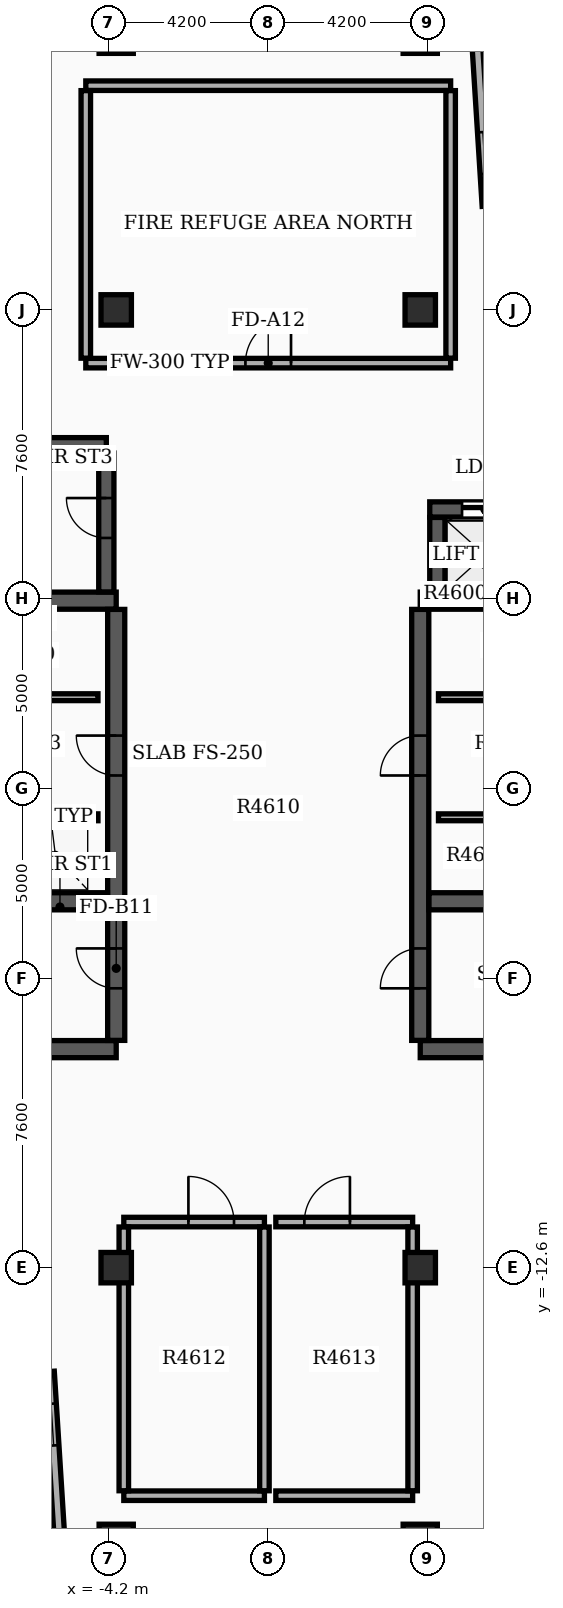
"""IFC4 building model, lengths in metres.
Left out: names, types, materials, properties, quantities, classifications, styles, units other than length and angle.
Written with IfcOpenShell. Run it as: python <this file> out.ifc"""

import sys

from ifc_helpers import new_model, si_unit, direction, frame, frame_2d, origin, origin_2d, place, context, subcontext, project, spatial, rectangle, circle, extrude, element, fill, save


model = new_model("IFC4")
c1 = context("Model", 3, precision=1e-05, world=origin(), true_north=direction((0.0, 1.0)))
c2 = subcontext(c1, "Body", "Model", "MODEL_VIEW")
j1 = project(units=[si_unit("LENGTHUNIT", "METRE"), si_unit("PLANEANGLEUNIT", "RADIAN")], contexts=[c1])
p1 = place(None, origin())
s1 = spatial("IfcSite", under=j1, at=p1, CompositionType="ELEMENT")
p2 = place(p1, origin())
s2 = spatial("IfcBuilding", under=s1, at=p2, CompositionType="ELEMENT")
p3 = place(p2, frame((0.0, 0.0, 288.9)))
s3 = spatial("IfcBuildingStorey", under=s2, at=p3, CompositionType="ELEMENT", Elevation=288.9)
for number, where, z_axis, x_axis in (
    (1, (-12.4, -6.85, 0.0), (0.0, 0.0, 1.0), (1.0, 0.0, 0.0)),
    (2, (-12.4, 4.95, 0.0), (0.0, 0.0, 1.0), (1.0, 0.0, 0.0)),
):
    element("IfcWall", number, at=place(p3, frame(where, z_axis=z_axis, x_axis=x_axis)), inside=s3, PredefinedType="SHEAR", context=c2, shape_type="SweptSolid", body=[
        extrude(rectangle(XDim=8.4, YDim=0.45, at=frame_2d((4.2, 0.0))), origin(), (0.0, 0.0, 1.0), 4.85),
    ])
p4 = place(p3, frame((-4.0, -6.62, 0.0), z_axis=(0.0, 0.0, 1.0), x_axis=(0.0, 1.0, 0.0)))
e3 = element("IfcWall", 3, at=p4, inside=s3, PredefinedType="SHEAR", context=c2, shape_type="SweptSolid", body=[
    extrude(rectangle(XDim=11.34, YDim=0.45, at=frame_2d((5.67, 0.0))), origin(), (0.0, 0.0, 1.0), 4.85),
])
p5 = place(p4, frame((1.37, 0.0, 0.0)))
e4 = element("IfcOpeningElement", 4, at=p5, cuts=e3, PredefinedType="OPENING", context=c2, shape_type="SweptSolid", body=[
    extrude(rectangle(XDim=1.05, YDim=2.15, at=frame_2d((0.525, 1.075))), frame((0.0, 0.235, 0.0), z_axis=(0.0, -1.0, 0.0), x_axis=(1.0, 0.0, 0.0)), (0.0, 0.0, 1.0), 0.47),
])
p6 = place(p4, frame((6.97, 0.0, 0.0)))
e5 = element("IfcOpeningElement", 5, at=p6, cuts=e3, PredefinedType="OPENING", context=c2, shape_type="SweptSolid", body=[
    extrude(rectangle(XDim=1.05, YDim=2.15, at=frame_2d((0.525, 1.075))), frame((0.0, 0.235, 0.0), z_axis=(0.0, -1.0, 0.0), x_axis=(1.0, 0.0, 0.0)), (0.0, 0.0, 1.0), 0.47),
])
p7 = place(p3, frame((-12.17, -2.96, 0.0), z_axis=(0.0, 0.0, 1.0), x_axis=(1.0, 0.0, 0.0)))
e6 = element("IfcWall", 6, at=p7, inside=s3, PredefinedType="SHEAR", context=c2, shape_type="SweptSolid", body=[
    extrude(rectangle(XDim=7.94, YDim=0.45, at=frame_2d((3.97, 0.0))), origin(), (0.0, 0.0, 1.0), 4.85),
])
for number, where, z_axis, x_axis in (
    (7, (4.0, -6.85, 0.0), (0.0, 0.0, 1.0), (1.0, 0.0, 0.0)),
    (8, (4.0, 4.95, 0.0), (0.0, 0.0, 1.0), (1.0, 0.0, 0.0)),
):
    element("IfcWall", number, at=place(p3, frame(where, z_axis=z_axis, x_axis=x_axis)), inside=s3, PredefinedType="SHEAR", context=c2, shape_type="SweptSolid", body=[
        extrude(rectangle(XDim=8.4, YDim=0.45, at=frame_2d((4.2, 0.0))), origin(), (0.0, 0.0, 1.0), 4.85),
    ])
p8 = place(p3, frame((4.0, -6.62, 0.0), z_axis=(0.0, 0.0, 1.0), x_axis=(0.0, 1.0, 0.0)))
e9 = element("IfcWall", 9, at=p8, inside=s3, PredefinedType="SHEAR", context=c2, shape_type="SweptSolid", body=[
    extrude(rectangle(XDim=11.34, YDim=0.45, at=frame_2d((5.67, 0.0))), origin(), (0.0, 0.0, 1.0), 4.85),
])
p9 = place(p8, frame((1.37, 0.0, 0.0)))
e10 = element("IfcOpeningElement", 10, at=p9, cuts=e9, PredefinedType="OPENING", context=c2, shape_type="SweptSolid", body=[
    extrude(rectangle(XDim=1.05, YDim=2.15, at=frame_2d((0.525, 1.075))), frame((0.0, 0.235, 0.0), z_axis=(0.0, -1.0, 0.0), x_axis=(1.0, 0.0, 0.0)), (0.0, 0.0, 1.0), 0.47),
])
p10 = place(p8, frame((6.97, 0.0, 0.0)))
e11 = element("IfcOpeningElement", 11, at=p10, cuts=e9, PredefinedType="OPENING", context=c2, shape_type="SweptSolid", body=[
    extrude(rectangle(XDim=1.05, YDim=2.15, at=frame_2d((0.525, 1.075))), frame((0.0, 0.235, 0.0), z_axis=(0.0, -1.0, 0.0), x_axis=(1.0, 0.0, 0.0)), (0.0, 0.0, 1.0), 0.47),
])
p11 = place(p3, frame((4.23, -2.96, 0.0), z_axis=(0.0, 0.0, 1.0), x_axis=(1.0, 0.0, 0.0)))
e12 = element("IfcWall", 12, at=p11, inside=s3, PredefinedType="SHEAR", context=c2, shape_type="SweptSolid", body=[
    extrude(rectangle(XDim=7.94, YDim=0.45, at=frame_2d((3.97, 0.0))), origin(), (0.0, 0.0, 1.0), 4.85),
])
p12 = place(p3, frame((-12.22, 9.04, 0.0), z_axis=(0.0, 0.0, 1.0), x_axis=(1.0, 0.0, 0.0)))
e13 = element("IfcWall", 13, at=p12, inside=s3, PredefinedType="SHEAR", context=c2, shape_type="SweptSolid", body=[
    extrude(rectangle(XDim=7.96, YDim=0.4, at=frame_2d((3.98, 0.0))), origin(), (0.0, 0.0, 1.0), 4.85),
])
p13 = place(p3, frame((-4.26, 5.18, 0.0), z_axis=(0.0, 0.0, 1.0), x_axis=(0.0, 1.0, 0.0)))
e14 = element("IfcWall", 14, at=p13, inside=s3, PredefinedType="SHEAR", context=c2, shape_type="SweptSolid", body=[
    extrude(rectangle(XDim=3.655, YDim=0.4, at=frame_2d((1.828, 0.0))), origin(), (0.0, 0.0, 1.0), 4.85),
])
p14 = place(p13, frame((1.42, 0.0, 0.0)))
e15 = element("IfcOpeningElement", 15, at=p14, cuts=e14, PredefinedType="OPENING", context=c2, shape_type="SweptSolid", body=[
    extrude(rectangle(XDim=1.05, YDim=2.15, at=frame_2d((0.525, 1.075))), frame((0.0, 0.21, 0.0), z_axis=(0.0, -1.0, 0.0), x_axis=(1.0, 0.0, 0.0)), (0.0, 0.0, 1.0), 0.42),
])
p15 = place(p3, frame((4.45, 5.18, 0.0), z_axis=(0.0, 0.0, 1.0), x_axis=(0.0, 1.0, 0.0)))
e16 = element("IfcWall", 16, at=p15, inside=s3, PredefinedType="SHEAR", context=c2, shape_type="SweptSolid", body=[
    extrude(rectangle(XDim=1.96, YDim=0.4, at=frame_2d((0.98, 0.0))), origin(), (0.0, 0.0, 1.0), 4.85),
])
p16 = place(p3, frame((4.25, 7.35, 0.0), z_axis=(0.0, 0.0, 1.0), x_axis=(1.0, 0.0, 0.0)))
e17 = element("IfcWall", 17, at=p16, inside=s3, PredefinedType="SHEAR", context=c2, shape_type="SweptSolid", body=[
    extrude(rectangle(XDim=5.4, YDim=0.4, at=frame_2d((2.7, 0.0))), origin(), (0.0, 0.0, 1.0), 4.85),
])
p17 = place(p16, frame((0.85, 0.0, 0.0)))
e18 = element("IfcOpeningElement", 18, at=p17, cuts=e17, PredefinedType="OPENING", context=c2, shape_type="SweptSolid", body=[
    extrude(rectangle(XDim=1.2, YDim=2.2, at=frame_2d((0.6, 1.1))), frame((0.0, 0.21, 0.0), z_axis=(0.0, -1.0, 0.0), x_axis=(1.0, 0.0, 0.0)), (0.0, 0.0, 1.0), 0.42),
])
p18 = place(p16, frame((3.25, 0.0, 0.0)))
e19 = element("IfcOpeningElement", 19, at=p18, cuts=e17, PredefinedType="OPENING", context=c2, shape_type="SweptSolid", body=[
    extrude(rectangle(XDim=1.2, YDim=2.2, at=frame_2d((0.6, 1.1))), frame((0.0, 0.21, 0.0), z_axis=(0.0, -1.0, 0.0), x_axis=(1.0, 0.0, 0.0)), (0.0, 0.0, 1.0), 0.42),
])
for number, where, z_axis, x_axis in (
    (20, (-4.0, -12.6, 0.0), (0.0, 0.0, 1.0), (1.0, 0.0, 0.0)),
    (21, (4.0, -12.6, 0.0), (0.0, 0.0, 1.0), (1.0, 0.0, 0.0)),
    (22, (4.0, 12.6, 0.0), (0.0, 0.0, 1.0), (1.0, 0.0, 0.0)),
    (23, (-4.0, 12.6, 0.0), (0.0, 0.0, 1.0), (1.0, 0.0, 0.0)),
):
    element("IfcColumn", number, at=place(p3, frame(where, z_axis=z_axis, x_axis=x_axis)), inside=s3, PredefinedType="COLUMN", context=c2, shape_type="SweptSolid", body=[
        extrude(rectangle(XDim=0.8, YDim=0.8, at=origin_2d()), origin(), (0.0, 0.0, 1.0), 5.1),
    ])
for number, where, z_axis, x_axis in (
    (24, (-4.0, -19.8, 0.0), (0.0, 0.0, 1.0), (1.0, 0.0, 0.0)),
    (25, (4.0, -19.8, 0.0), (0.0, 0.0, 1.0), (1.0, 0.0, 0.0)),
    (26, (-4.0, 19.8, 0.0), (0.0, 0.0, 1.0), (1.0, 0.0, 0.0)),
    (27, (4.0, 19.8, 0.0), (0.0, 0.0, 1.0), (1.0, 0.0, 0.0)),
):
    element("IfcColumn", number, at=place(p3, frame(where, z_axis=z_axis, x_axis=x_axis)), inside=s3, PredefinedType="COLUMN", context=c2, shape_type="SweptSolid", body=[
        extrude(circle(Radius=0.45, at=origin_2d()), origin(), (0.0, 0.0, 1.0), 5.1),
    ])
p19 = place(p3, frame((5.769, 15.333, 0.0), z_axis=(0.0, 0.0, 1.0), x_axis=(-0.062779465852, 0.998027423805, 0.0)))
e28 = element("IfcWall", 28, at=p19, inside=s3, PredefinedType="STANDARD", context=c2, shape_type="SweptSolid", body=[
    extrude(rectangle(XDim=14.7, YDim=0.28, at=frame_2d((7.35, 0.0))), origin(), (0.0, 0.0, 1.0), 3.93),
])
p20 = place(p19, frame((0.85, 0.0, 0.95)))
e29 = element("IfcOpeningElement", 29, at=p20, cuts=e28, PredefinedType="OPENING", context=c2, shape_type="SweptSolid", body=[
    extrude(rectangle(XDim=1.1, YDim=1.2, at=frame_2d((0.55, 0.6))), frame((0.0, 0.15, 0.0), z_axis=(0.0, -1.0, 0.0), x_axis=(1.0, 0.0, 0.0)), (0.0, 0.0, 1.0), 0.3),
])
p21 = place(p3, frame((-5.769, -15.333, 0.0), z_axis=(0.0, 0.0, 1.0), x_axis=(0.062779465852, -0.998027423805, 0.0)))
e30 = element("IfcWall", 30, at=p21, inside=s3, PredefinedType="STANDARD", context=c2, shape_type="SweptSolid", body=[
    extrude(rectangle(XDim=14.7, YDim=0.28, at=frame_2d((7.35, 0.0))), origin(), (0.0, 0.0, 1.0), 3.93),
])
p22 = place(p21, frame((0.85, 0.0, 0.95)))
e31 = element("IfcOpeningElement", 31, at=p22, cuts=e30, PredefinedType="OPENING", context=c2, shape_type="SweptSolid", body=[
    extrude(rectangle(XDim=1.1, YDim=1.2, at=frame_2d((0.55, 0.6))), frame((0.0, 0.15, 0.0), z_axis=(0.0, -1.0, 0.0), x_axis=(1.0, 0.0, 0.0)), (0.0, 0.0, 1.0), 0.3),
])
p23 = place(p3, frame((-11.9, 2.41, 0.0), z_axis=(0.0, 0.0, 1.0), x_axis=(1.0, 0.0, 0.0)))
e32 = element("IfcWall", 32, at=p23, inside=s3, PredefinedType="SOLIDWALL", context=c2, shape_type="SweptSolid", body=[
    extrude(rectangle(XDim=7.42, YDim=0.18, at=frame_2d((3.71, 0.0))), origin(), (0.0, 0.0, 1.0), 3.92),
])
p24 = place(p23, frame((0.55, 0.0, 0.0)))
e33 = element("IfcOpeningElement", 33, at=p24, cuts=e32, PredefinedType="OPENING", context=c2, shape_type="SweptSolid", body=[
    extrude(rectangle(XDim=1.1, YDim=2.15, at=frame_2d((0.55, 1.075))), frame((0.0, 0.1, 0.0), z_axis=(0.0, -1.0, 0.0), x_axis=(1.0, 0.0, 0.0)), (0.0, 0.0, 1.0), 0.2),
])
p25 = place(p23, frame((4.9, 0.0, 0.0)))
e34 = element("IfcOpeningElement", 34, at=p25, cuts=e32, PredefinedType="OPENING", context=c2, shape_type="SweptSolid", body=[
    extrude(rectangle(XDim=0.88, YDim=2.1, at=frame_2d((0.44, 1.05))), frame((0.0, 0.1, 0.0), z_axis=(0.0, -1.0, 0.0), x_axis=(1.0, 0.0, 0.0)), (0.0, 0.0, 1.0), 0.2),
])
p26 = place(p3, frame((4.48, 2.41, 0.0), z_axis=(0.0, 0.0, 1.0), x_axis=(1.0, 0.0, 0.0)))
e35 = element("IfcWall", 35, at=p26, inside=s3, PredefinedType="SOLIDWALL", context=c2, shape_type="SweptSolid", body=[
    extrude(rectangle(XDim=7.42, YDim=0.18, at=frame_2d((3.71, 0.0))), origin(), (0.0, 0.0, 1.0), 3.92),
])
p27 = place(p26, frame((5.67, 0.0, 0.0)))
e36 = element("IfcOpeningElement", 36, at=p27, cuts=e35, PredefinedType="OPENING", context=c2, shape_type="SweptSolid", body=[
    extrude(rectangle(XDim=1.1, YDim=2.15, at=frame_2d((0.55, 1.075))), frame((0.0, 0.1, 0.0), z_axis=(0.0, -1.0, 0.0), x_axis=(1.0, 0.0, 0.0)), (0.0, 0.0, 1.0), 0.2),
])
p28 = place(p26, frame((1.6, 0.0, 0.0)))
e37 = element("IfcOpeningElement", 37, at=p28, cuts=e35, PredefinedType="OPENING", context=c2, shape_type="SweptSolid", body=[
    extrude(rectangle(XDim=0.88, YDim=2.1, at=frame_2d((0.44, 1.05))), frame((0.0, 0.1, 0.0), z_axis=(0.0, -1.0, 0.0), x_axis=(1.0, 0.0, 0.0)), (0.0, 0.0, 1.0), 0.2),
])
p29 = place(p3, frame((-11.9, -0.75, 0.0), z_axis=(0.0, 0.0, 1.0), x_axis=(1.0, 0.0, 0.0)))
e38 = element("IfcWall", 38, at=p29, inside=s3, PredefinedType="SOLIDWALL", context=c2, shape_type="SweptSolid", body=[
    extrude(rectangle(XDim=7.42, YDim=0.18, at=frame_2d((3.71, 0.0))), origin(), (0.0, 0.0, 1.0), 3.92),
])
p30 = place(p29, frame((1.6, 0.0, 0.0)))
e39 = element("IfcOpeningElement", 39, at=p30, cuts=e38, PredefinedType="OPENING", context=c2, shape_type="SweptSolid", body=[
    extrude(rectangle(XDim=0.88, YDim=2.1, at=frame_2d((0.44, 1.05))), frame((0.0, 0.1, 0.0), z_axis=(0.0, -1.0, 0.0), x_axis=(1.0, 0.0, 0.0)), (0.0, 0.0, 1.0), 0.2),
])
p31 = place(p3, frame((4.48, -0.75, 0.0), z_axis=(0.0, 0.0, 1.0), x_axis=(1.0, 0.0, 0.0)))
e40 = element("IfcWall", 40, at=p31, inside=s3, PredefinedType="SOLIDWALL", context=c2, shape_type="SweptSolid", body=[
    extrude(rectangle(XDim=7.42, YDim=0.18, at=frame_2d((3.71, 0.0))), origin(), (0.0, 0.0, 1.0), 3.92),
])
p32 = place(p31, frame((1.6, 0.0, 0.0)))
e41 = element("IfcOpeningElement", 41, at=p32, cuts=e40, PredefinedType="OPENING", context=c2, shape_type="SweptSolid", body=[
    extrude(rectangle(XDim=0.88, YDim=2.1, at=frame_2d((0.44, 1.05))), frame((0.0, 0.1, 0.0), z_axis=(0.0, -1.0, 0.0), x_axis=(1.0, 0.0, 0.0)), (0.0, 0.0, 1.0), 0.2),
])
p33 = place(p3, frame((-4.8, 11.2, 0.0), z_axis=(0.0, 0.0, 1.0), x_axis=(1.0, 0.0, 0.0)))
e42 = element("IfcWall", 42, at=p33, inside=s3, PredefinedType="SOLIDWALL", context=c2, shape_type="SweptSolid", body=[
    extrude(rectangle(XDim=9.6, YDim=0.25, at=frame_2d((4.8, 0.0))), origin(), (0.0, 0.0, 1.0), 3.92),
])
p34 = place(p33, frame((4.2, 0.0, 0.0)))
e43 = element("IfcOpeningElement", 43, at=p34, cuts=e42, PredefinedType="OPENING", context=c2, shape_type="SweptSolid", body=[
    extrude(rectangle(XDim=1.2, YDim=2.15, at=frame_2d((0.6, 1.075))), frame((0.0, 0.135, 0.0), z_axis=(0.0, -1.0, 0.0), x_axis=(1.0, 0.0, 0.0)), (0.0, 0.0, 1.0), 0.27),
])
p35 = place(p3, frame((-4.8, 18.5, 0.0), z_axis=(0.0, 0.0, 1.0), x_axis=(1.0, 0.0, 0.0)))
e44 = element("IfcWall", 44, at=p35, inside=s3, PredefinedType="SOLIDWALL", context=c2, shape_type="SweptSolid", body=[
    extrude(rectangle(XDim=9.6, YDim=0.25, at=frame_2d((4.8, 0.0))), origin(), (0.0, 0.0, 1.0), 3.92),
])
for number, where, z_axis, x_axis in (
    (45, (-4.8, 11.33, 0.0), (0.0, 0.0, 1.0), (0.0, 1.0, 0.0)),
    (46, (4.8, 11.33, 0.0), (0.0, 0.0, 1.0), (0.0, 1.0, 0.0)),
):
    element("IfcWall", number, at=place(p3, frame(where, z_axis=z_axis, x_axis=x_axis)), inside=s3, PredefinedType="SOLIDWALL", context=c2, shape_type="SweptSolid", body=[
        extrude(rectangle(XDim=7.04, YDim=0.25, at=frame_2d((3.52, 0.0))), origin(), (0.0, 0.0, 1.0), 3.92),
    ])
p36 = place(p3, frame((-3.8, -18.6, 0.0), z_axis=(0.0, 0.0, 1.0), x_axis=(1.0, 0.0, 0.0)))
e47 = element("IfcWall", 47, at=p36, inside=s3, PredefinedType="SOLIDWALL", context=c2, shape_type="SweptSolid", body=[
    extrude(rectangle(XDim=3.7, YDim=0.25, at=frame_2d((1.85, 0.0))), origin(), (0.0, 0.0, 1.0), 3.92),
])
p37 = place(p3, frame((-3.8, -11.4, 0.0), z_axis=(0.0, 0.0, 1.0), x_axis=(1.0, 0.0, 0.0)))
e48 = element("IfcWall", 48, at=p37, inside=s3, PredefinedType="SOLIDWALL", context=c2, shape_type="SweptSolid", body=[
    extrude(rectangle(XDim=3.7, YDim=0.25, at=frame_2d((1.85, 0.0))), origin(), (0.0, 0.0, 1.0), 3.92),
])
p38 = place(p37, frame((1.7, 0.0, 0.0)))
e49 = element("IfcOpeningElement", 49, at=p38, cuts=e48, PredefinedType="OPENING", context=c2, shape_type="SweptSolid", body=[
    extrude(rectangle(XDim=1.2, YDim=2.15, at=frame_2d((0.6, 1.075))), frame((0.0, 0.135, 0.0), z_axis=(0.0, -1.0, 0.0), x_axis=(1.0, 0.0, 0.0)), (0.0, 0.0, 1.0), 0.27),
])
for number, where, z_axis, x_axis in (
    (50, (-3.8, -18.47, 0.0), (0.0, 0.0, 1.0), (0.0, 1.0, 0.0)),
    (51, (-0.1, -18.47, 0.0), (0.0, 0.0, 1.0), (0.0, 1.0, 0.0)),
):
    element("IfcWall", number, at=place(p3, frame(where, z_axis=z_axis, x_axis=x_axis)), inside=s3, PredefinedType="SOLIDWALL", context=c2, shape_type="SweptSolid", body=[
        extrude(rectangle(XDim=6.94, YDim=0.25, at=frame_2d((3.47, 0.0))), origin(), (0.0, 0.0, 1.0), 3.92),
    ])
p39 = place(p3, frame((0.2, -18.6, 0.0), z_axis=(0.0, 0.0, 1.0), x_axis=(1.0, 0.0, 0.0)))
e52 = element("IfcWall", 52, at=p39, inside=s3, PredefinedType="SOLIDWALL", context=c2, shape_type="SweptSolid", body=[
    extrude(rectangle(XDim=3.6, YDim=0.25, at=frame_2d((1.8, 0.0))), origin(), (0.0, 0.0, 1.0), 3.92),
])
p40 = place(p3, frame((0.2, -11.4, 0.0), z_axis=(0.0, 0.0, 1.0), x_axis=(1.0, 0.0, 0.0)))
e53 = element("IfcWall", 53, at=p40, inside=s3, PredefinedType="SOLIDWALL", context=c2, shape_type="SweptSolid", body=[
    extrude(rectangle(XDim=3.6, YDim=0.25, at=frame_2d((1.8, 0.0))), origin(), (0.0, 0.0, 1.0), 3.92),
])
p41 = place(p40, frame((0.75, 0.0, 0.0)))
e54 = element("IfcOpeningElement", 54, at=p41, cuts=e53, PredefinedType="OPENING", context=c2, shape_type="SweptSolid", body=[
    extrude(rectangle(XDim=1.2, YDim=2.15, at=frame_2d((0.6, 1.075))), frame((0.0, 0.135, 0.0), z_axis=(0.0, -1.0, 0.0), x_axis=(1.0, 0.0, 0.0)), (0.0, 0.0, 1.0), 0.27),
])
p42 = place(p3, frame((3.8, -18.47, 0.0), z_axis=(0.0, 0.0, 1.0), x_axis=(0.0, 1.0, 0.0)))
e55 = element("IfcWall", 55, at=p42, inside=s3, PredefinedType="SOLIDWALL", context=c2, shape_type="SweptSolid", body=[
    extrude(rectangle(XDim=6.94, YDim=0.25, at=frame_2d((3.47, 0.0))), origin(), (0.0, 0.0, 1.0), 3.92),
])
p43 = place(p20, origin())
e56 = element("IfcWindow", 56, at=p43, inside=s3, PartitioningType="SINGLE_PANEL", PredefinedType="WINDOW", context=c2, shape_type="SweptSolid", body=[
    extrude(rectangle(XDim=1.1, YDim=1.2, at=frame_2d((0.55, 0.6))), frame((0.0, 0.03, 0.0), z_axis=(0.0, -1.0, 0.0), x_axis=(1.0, 0.0, 0.0)), (0.0, 0.0, 1.0), 0.06),
])
fill(e29, e56)
p44 = place(p22, origin())
e57 = element("IfcWindow", 57, at=p44, inside=s3, PartitioningType="SINGLE_PANEL", PredefinedType="WINDOW", context=c2, shape_type="SweptSolid", body=[
    extrude(rectangle(XDim=1.1, YDim=1.2, at=frame_2d((0.55, 0.6))), frame((0.0, 0.03, 0.0), z_axis=(0.0, -1.0, 0.0), x_axis=(1.0, 0.0, 0.0)), (0.0, 0.0, 1.0), 0.06),
])
fill(e31, e57)
p45 = place(p5, origin())
e58 = element("IfcDoor", 58, at=p45, inside=s3, OperationType="SINGLE_SWING_RIGHT", PredefinedType="DOOR", context=c2, shape_type="SweptSolid", body=[
    extrude(rectangle(XDim=1.05, YDim=2.15, at=frame_2d((0.525, 1.075))), frame((0.0, 0.025, 0.0), z_axis=(0.0, -1.0, 0.0), x_axis=(1.0, 0.0, 0.0)), (0.0, 0.0, 1.0), 0.05),
])
fill(e4, e58)
p46 = place(p9, origin())
e59 = element("IfcDoor", 59, at=p46, inside=s3, OperationType="SINGLE_SWING_LEFT", PredefinedType="DOOR", context=c2, shape_type="SweptSolid", body=[
    extrude(rectangle(XDim=1.05, YDim=2.15, at=frame_2d((0.525, 1.075))), frame((0.0, 0.025, 0.0), z_axis=(0.0, -1.0, 0.0), x_axis=(1.0, 0.0, 0.0)), (0.0, 0.0, 1.0), 0.05),
])
fill(e10, e59)
p47 = place(p6, origin())
e60 = element("IfcDoor", 60, at=p47, inside=s3, OperationType="SINGLE_SWING_RIGHT", PredefinedType="DOOR", context=c2, shape_type="SweptSolid", body=[
    extrude(rectangle(XDim=1.05, YDim=2.15, at=frame_2d((0.525, 1.075))), frame((0.0, 0.025, 0.0), z_axis=(0.0, -1.0, 0.0), x_axis=(1.0, 0.0, 0.0)), (0.0, 0.0, 1.0), 0.05),
])
fill(e5, e60)
p48 = place(p10, origin())
e61 = element("IfcDoor", 61, at=p48, inside=s3, OperationType="SINGLE_SWING_LEFT", PredefinedType="DOOR", context=c2, shape_type="SweptSolid", body=[
    extrude(rectangle(XDim=1.05, YDim=2.15, at=frame_2d((0.525, 1.075))), frame((0.0, 0.025, 0.0), z_axis=(0.0, -1.0, 0.0), x_axis=(1.0, 0.0, 0.0)), (0.0, 0.0, 1.0), 0.05),
])
fill(e11, e61)
p49 = place(p14, origin())
e62 = element("IfcDoor", 62, at=p49, inside=s3, OperationType="SINGLE_SWING_RIGHT", PredefinedType="DOOR", context=c2, shape_type="SweptSolid", body=[
    extrude(rectangle(XDim=1.05, YDim=2.15, at=frame_2d((0.525, 1.075))), frame((0.0, 0.025, 0.0), z_axis=(0.0, -1.0, 0.0), x_axis=(1.0, 0.0, 0.0)), (0.0, 0.0, 1.0), 0.05),
])
fill(e15, e62)
p50 = place(p17, origin())
e63 = element("IfcDoor", 63, at=p50, inside=s3, OperationType="DOUBLE_DOOR_SLIDING", PredefinedType="DOOR", context=c2, shape_type="SweptSolid", body=[
    extrude(rectangle(XDim=1.2, YDim=2.2, at=frame_2d((0.6, 1.1))), frame((0.0, 0.025, 0.0), z_axis=(0.0, -1.0, 0.0), x_axis=(1.0, 0.0, 0.0)), (0.0, 0.0, 1.0), 0.05),
])
fill(e18, e63)
p51 = place(p34, origin())
e64 = element("IfcDoor", 64, at=p51, inside=s3, OperationType="SINGLE_SWING_RIGHT", PredefinedType="DOOR", context=c2, shape_type="SweptSolid", body=[
    extrude(rectangle(XDim=1.2, YDim=2.15, at=frame_2d((0.6, 1.075))), frame((0.0, 0.025, 0.0), z_axis=(0.0, -1.0, 0.0), x_axis=(1.0, 0.0, 0.0)), (0.0, 0.0, 1.0), 0.05),
])
fill(e43, e64)
p52 = place(p38, origin())
e65 = element("IfcDoor", 65, at=p52, inside=s3, OperationType="SINGLE_SWING_LEFT", PredefinedType="DOOR", context=c2, shape_type="SweptSolid", body=[
    extrude(rectangle(XDim=1.2, YDim=2.15, at=frame_2d((0.6, 1.075))), frame((0.0, 0.025, 0.0), z_axis=(0.0, -1.0, 0.0), x_axis=(1.0, 0.0, 0.0)), (0.0, 0.0, 1.0), 0.05),
])
fill(e49, e65)
p53 = place(p41, origin())
e66 = element("IfcDoor", 66, at=p53, inside=s3, OperationType="SINGLE_SWING_RIGHT", PredefinedType="DOOR", context=c2, shape_type="SweptSolid", body=[
    extrude(rectangle(XDim=1.2, YDim=2.15, at=frame_2d((0.6, 1.075))), frame((0.0, 0.025, 0.0), z_axis=(0.0, -1.0, 0.0), x_axis=(1.0, 0.0, 0.0)), (0.0, 0.0, 1.0), 0.05),
])
fill(e54, e66)
save(model, sys.argv[1])
